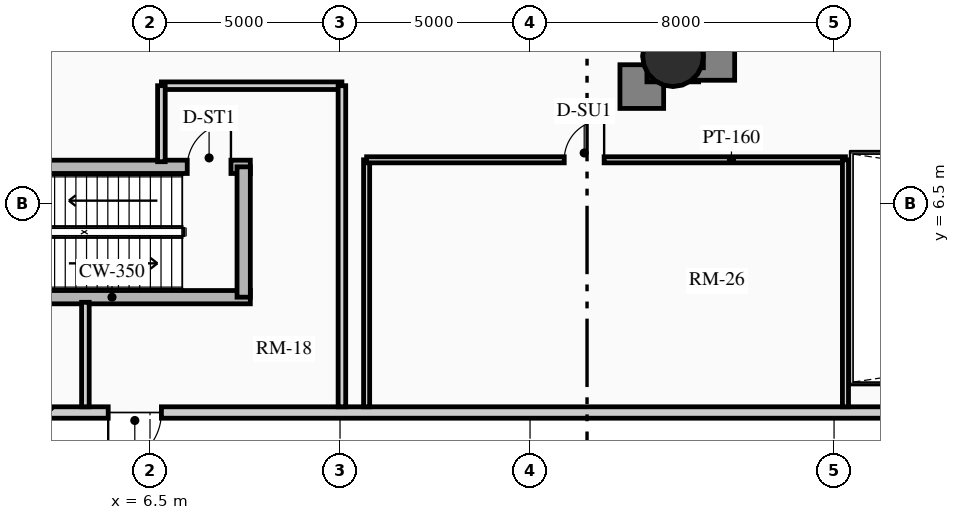
"""IFC4 building model, lengths in metres.
Left out: names, types, materials, properties, quantities, classifications, styles, units other than length and angle.
Written with IfcOpenShell. Run it as: python <this file> out.ifc"""

import sys

from ifc_helpers import new_model, si_unit, direction, frame, frame_2d, origin, origin_2d, place, context, subcontext, project, spatial, rectangle, circle, extrude, source, transform, mapped, element, fill, save


model = new_model("IFC4")
c1 = context("Model", 3, precision=1e-05, world=origin(), true_north=direction((0.0, 1.0)))
c2 = subcontext(c1, "Body", "Model", "MODEL_VIEW")
j1 = project(units=[si_unit("LENGTHUNIT", "METRE"), si_unit("PLANEANGLEUNIT", "RADIAN")], contexts=[c1])
p1 = place(None, origin())
s1 = spatial("IfcSite", under=j1, at=p1, CompositionType="ELEMENT")
p2 = place(p1, origin())
s2 = spatial("IfcBuilding", under=s1, at=p2, CompositionType="ELEMENT")
p3 = place(p2, origin())
s3 = spatial("IfcBuildingStorey", under=s2, at=p3, CompositionType="ELEMENT", Elevation=0.0)
p4 = place(p3, frame((1.86, 4.035, 0.0), z_axis=(0.0, 0.0, 1.0), x_axis=(1.0, 0.0, 0.0)))
e1 = element("IfcWall", 1, at=p4, inside=s3, PredefinedType="SHEAR", context=c2, shape_type="SweptSolid", body=[
    extrude(rectangle(XDim=7.28, YDim=0.35, at=frame_2d((3.64, 0.0))), origin(), (0.0, 0.0, 1.0), 4.8),
])
p5 = place(p3, frame((1.86, 7.465, 0.0), z_axis=(0.0, 0.0, 1.0), x_axis=(1.0, 0.0, 0.0)))
e2 = element("IfcWall", 2, at=p5, inside=s3, PredefinedType="SHEAR", context=c2, shape_type="SweptSolid", body=[
    extrude(rectangle(XDim=7.28, YDim=0.35, at=frame_2d((3.64, 0.0))), origin(), (0.0, 0.0, 1.0), 4.8),
])
m1 = source(origin(), c2, "Body", "SweptSolid", [
    extrude(rectangle(XDim=1.15, YDim=2.02, at=frame_2d((0.575, 1.01))), frame((0.0, 0.185, 0.0), z_axis=(0.0, -1.0, 0.0), x_axis=(1.0, 0.0, 0.0)), (0.0, 0.0, 1.0), 0.37),
])
p6 = place(p5, frame((5.62, 0.0, 0.0)))
e3 = element("IfcOpeningElement", 3, at=p6, cuts=e2, PredefinedType="OPENING", context=c2, shape_type="MappedRepresentation", body=[
    mapped(m1, transform((0.0, 0.0, 0.0), x_axis=(1.0, 0.0, 0.0), y_axis=(0.0, 1.0, 0.0), z_axis=(0.0, 0.0, 1.0), scale=1.0)),
])
p7 = place(p3, frame((8.965, 4.035, 0.0), z_axis=(0.0, 0.0, 1.0), x_axis=(0.0, 1.0, 0.0)))
e4 = element("IfcWall", 4, at=p7, inside=s3, PredefinedType="SHEAR", context=c2, shape_type="SweptSolid", body=[
    extrude(rectangle(XDim=3.43, YDim=0.35, at=frame_2d((1.715, 0.0))), origin(), (0.0, 0.0, 1.0), 4.8),
])
p8 = place(p3, frame((20.261, 10.377, 0.0), z_axis=(0.0, 0.0, 1.0), x_axis=(1.0, 0.0, 0.0)))
e5 = element("IfcColumn", 5, at=p8, inside=s3, PredefinedType="USERDEFINED", context=c2, shape_type="SweptSolid", body=[
    extrude(circle(Radius=0.8, at=origin_2d()), origin(), (0.0, 0.0, 1.0), 4.8),
])
p9 = place(p3, frame((78.3, 1.0, 0.0), z_axis=(0.0, 0.0, 1.0), x_axis=(-1.0, 0.0, 0.0)))
e6 = element("IfcWall", 6, at=p9, inside=s3, PredefinedType="SOLIDWALL", context=c2, shape_type="SweptSolid", body=[
    extrude(rectangle(XDim=74.5, YDim=0.3, at=frame_2d((37.25, 0.0))), origin(), (0.0, 0.0, 1.0), 4.485),
])
m2 = source(origin(), c2, "Body", "SweptSolid", [
    extrude(rectangle(XDim=3.4, YDim=3.0, at=frame_2d((1.7, 1.5))), frame((0.0, 0.16, 0.0), z_axis=(0.0, -1.0, 0.0), x_axis=(1.0, 0.0, 0.0)), (0.0, 0.0, 1.0), 0.32),
])
p10 = place(p9, frame((1.8, 0.0, 0.0)))
e7 = element("IfcOpeningElement", 7, at=p10, cuts=e6, PredefinedType="OPENING", context=c2, shape_type="MappedRepresentation", body=[
    mapped(m2, transform((0.0, 0.0, 0.0), x_axis=(1.0, 0.0, 0.0), y_axis=(0.0, 1.0, 0.0), z_axis=(0.0, 0.0, 1.0), scale=1.0)),
])
p11 = place(p9, frame((5.8, 0.0, 0.0)))
e8 = element("IfcOpeningElement", 8, at=p11, cuts=e6, PredefinedType="OPENING", context=c2, shape_type="MappedRepresentation", body=[
    mapped(m2, transform((0.0, 0.0, 0.0), x_axis=(1.0, 0.0, 0.0), y_axis=(0.0, 1.0, 0.0), z_axis=(0.0, 0.0, 1.0), scale=1.0)),
])
m3 = source(origin(), c2, "Body", "SweptSolid", [
    extrude(rectangle(XDim=2.0, YDim=2.25, at=frame_2d((1.0, 1.125))), frame((0.0, 0.16, 0.0), z_axis=(0.0, -1.0, 0.0), x_axis=(1.0, 0.0, 0.0)), (0.0, 0.0, 1.0), 0.32),
])
p12 = place(p9, frame((48.0, 0.0, 0.0)))
e9 = element("IfcOpeningElement", 9, at=p12, cuts=e6, PredefinedType="OPENING", context=c2, shape_type="MappedRepresentation", body=[
    mapped(m3, transform((0.0, 0.0, 0.0), x_axis=(1.0, 0.0, 0.0), y_axis=(0.0, 1.0, 0.0), z_axis=(0.0, 0.0, 1.0), scale=1.0)),
])
m4 = source(origin(), c2, "Body", "SweptSolid", [
    extrude(rectangle(XDim=1.4, YDim=2.15, at=frame_2d((0.7, 1.075))), frame((0.0, 0.16, 0.0), z_axis=(0.0, -1.0, 0.0), x_axis=(1.0, 0.0, 0.0)), (0.0, 0.0, 1.0), 0.32),
])
p13 = place(p9, frame((71.5, 0.0, 0.0)))
e10 = element("IfcOpeningElement", 10, at=p13, cuts=e6, PredefinedType="OPENING", context=c2, shape_type="MappedRepresentation", body=[
    mapped(m4, transform((0.0, 0.0, 0.0), x_axis=(1.0, 0.0, 0.0), y_axis=(0.0, 1.0, 0.0), z_axis=(0.0, 0.0, 1.0), scale=1.0)),
])
p14 = place(p3, frame((6.8, 9.6, 0.0), z_axis=(0.0, 0.0, 1.0), x_axis=(1.0, 0.0, 0.0)))
e11 = element("IfcWall", 11, at=p14, inside=s3, PredefinedType="PARTITIONING", context=c2, shape_type="SweptSolid", body=[
    extrude(rectangle(XDim=4.75, YDim=0.2, at=frame_2d((2.375, 0.0))), origin(), (0.0, 0.0, 1.0), 4.485),
])
p15 = place(p3, frame((6.8, 7.6, 0.0), z_axis=(0.0, 0.0, 1.0), x_axis=(0.0, 1.0, 0.0)))
e12 = element("IfcWall", 12, at=p15, inside=s3, PredefinedType="PARTITIONING", context=c2, shape_type="SweptSolid", body=[
    extrude(rectangle(XDim=2.0, YDim=0.2, at=frame_2d((1.0, 0.0))), origin(), (0.0, 0.0, 1.0), 4.485),
])
p16 = place(p3, frame((11.55, 1.15, 0.0), z_axis=(0.0, 0.0, 1.0), x_axis=(0.0, 1.0, 0.0)))
e13 = element("IfcWall", 13, at=p16, inside=s3, PredefinedType="PARTITIONING", context=c2, shape_type="SweptSolid", body=[
    extrude(rectangle(XDim=8.45, YDim=0.2, at=frame_2d((4.225, 0.0))), origin(), (0.0, 0.0, 1.0), 4.485),
])
p17 = place(p3, frame((4.8, 1.15, 0.0), z_axis=(0.0, 0.0, 1.0), x_axis=(0.0, 1.0, 0.0)))
e14 = element("IfcWall", 14, at=p17, inside=s3, PredefinedType="PARTITIONING", context=c2, shape_type="SweptSolid", body=[
    extrude(rectangle(XDim=2.75, YDim=0.2, at=frame_2d((1.375, 0.0))), origin(), (0.0, 0.0, 1.0), 4.485),
])
p18 = place(p3, frame((12.2, 1.15, 0.0), z_axis=(0.0, 0.0, 1.0), x_axis=(0.0, 1.0, 0.0)))
e15 = element("IfcWall", 15, at=p18, inside=s3, PredefinedType="PARTITIONING", context=c2, shape_type="SweptSolid", body=[
    extrude(rectangle(XDim=6.5, YDim=0.16, at=frame_2d((3.25, 0.0))), origin(), (0.0, 0.0, 1.0), 4.485),
])
p19 = place(p3, frame((12.2, 7.65, 0.0), z_axis=(0.0, 0.0, 1.0), x_axis=(1.0, 0.0, 0.0)))
e16 = element("IfcWall", 16, at=p19, inside=s3, PredefinedType="PARTITIONING", context=c2, shape_type="SweptSolid", body=[
    extrude(rectangle(XDim=12.6, YDim=0.16, at=frame_2d((6.3, 0.0))), origin(), (0.0, 0.0, 1.0), 4.485),
])
m5 = source(origin(), c2, "Body", "SweptSolid", [
    extrude(rectangle(XDim=1.05, YDim=2.015, at=frame_2d((0.525, 1.007))), frame((0.0, 0.09, 0.0), z_axis=(0.0, -1.0, 0.0), x_axis=(1.0, 0.0, 0.0)), (0.0, 0.0, 1.0), 0.18),
])
p20 = place(p19, frame((5.2, 0.0, 0.0)))
e17 = element("IfcOpeningElement", 17, at=p20, cuts=e16, PredefinedType="OPENING", context=c2, shape_type="MappedRepresentation", body=[
    mapped(m5, transform((0.0, 0.0, 0.0), x_axis=(1.0, 0.0, 0.0), y_axis=(0.0, 1.0, 0.0), z_axis=(0.0, 0.0, 1.0), scale=1.0)),
])
p21 = place(p3, frame((24.8, 1.15, 0.0), z_axis=(0.0, 0.0, 1.0), x_axis=(0.0, 1.0, 0.0)))
e18 = element("IfcWall", 18, at=p21, inside=s3, PredefinedType="PARTITIONING", context=c2, shape_type="SweptSolid", body=[
    extrude(rectangle(XDim=6.5, YDim=0.16, at=frame_2d((3.25, 0.0))), origin(), (0.0, 0.0, 1.0), 4.485),
])
m6 = source(origin(), c2, "Body", "SweptSolid", [
    extrude(rectangle(XDim=1.4, YDim=2.15, at=frame_2d((0.7, 1.075))), frame((0.0, 0.025, 0.0), z_axis=(0.0, -1.0, 0.0), x_axis=(1.0, 0.0, 0.0)), (0.0, 0.0, 1.0), 0.05),
])
p22 = place(p13, origin())
e19 = element("IfcDoor", 19, at=p22, inside=s3, OperationType="SINGLE_SWING_RIGHT", PredefinedType="DOOR", context=c2, shape_type="MappedRepresentation", body=[
    mapped(m6, transform((0.0, 0.0, 0.0), x_axis=(1.0, 0.0, 0.0), y_axis=(0.0, 1.0, 0.0), z_axis=(0.0, 0.0, 1.0), scale=1.0)),
])
fill(e10, e19)
m7 = source(origin(), c2, "Body", "SweptSolid", [
    extrude(rectangle(XDim=1.15, YDim=2.02, at=frame_2d((0.575, 1.01))), frame((0.0, 0.025, 0.0), z_axis=(0.0, -1.0, 0.0), x_axis=(1.0, 0.0, 0.0)), (0.0, 0.0, 1.0), 0.05),
])
p23 = place(p6, origin())
e20 = element("IfcDoor", 20, at=p23, inside=s3, OperationType="SINGLE_SWING_RIGHT", PredefinedType="DOOR", context=c2, shape_type="MappedRepresentation", body=[
    mapped(m7, transform((0.0, 0.0, 0.0), x_axis=(1.0, 0.0, 0.0), y_axis=(0.0, 1.0, 0.0), z_axis=(0.0, 0.0, 1.0), scale=1.0)),
])
fill(e3, e20)
m8 = source(origin(), c2, "Body", "SweptSolid", [
    extrude(rectangle(XDim=1.05, YDim=2.015, at=frame_2d((0.525, 1.007))), frame((0.0, 0.025, 0.0), z_axis=(0.0, -1.0, 0.0), x_axis=(1.0, 0.0, 0.0)), (0.0, 0.0, 1.0), 0.05),
])
p24 = place(p20, origin())
e21 = element("IfcDoor", 21, at=p24, inside=s3, OperationType="SINGLE_SWING_RIGHT", PredefinedType="DOOR", context=c2, shape_type="MappedRepresentation", body=[
    mapped(m8, transform((0.0, 0.0, 0.0), x_axis=(1.0, 0.0, 0.0), y_axis=(0.0, 1.0, 0.0), z_axis=(0.0, 0.0, 1.0), scale=1.0)),
])
fill(e17, e21)
save(model, sys.argv[1])
